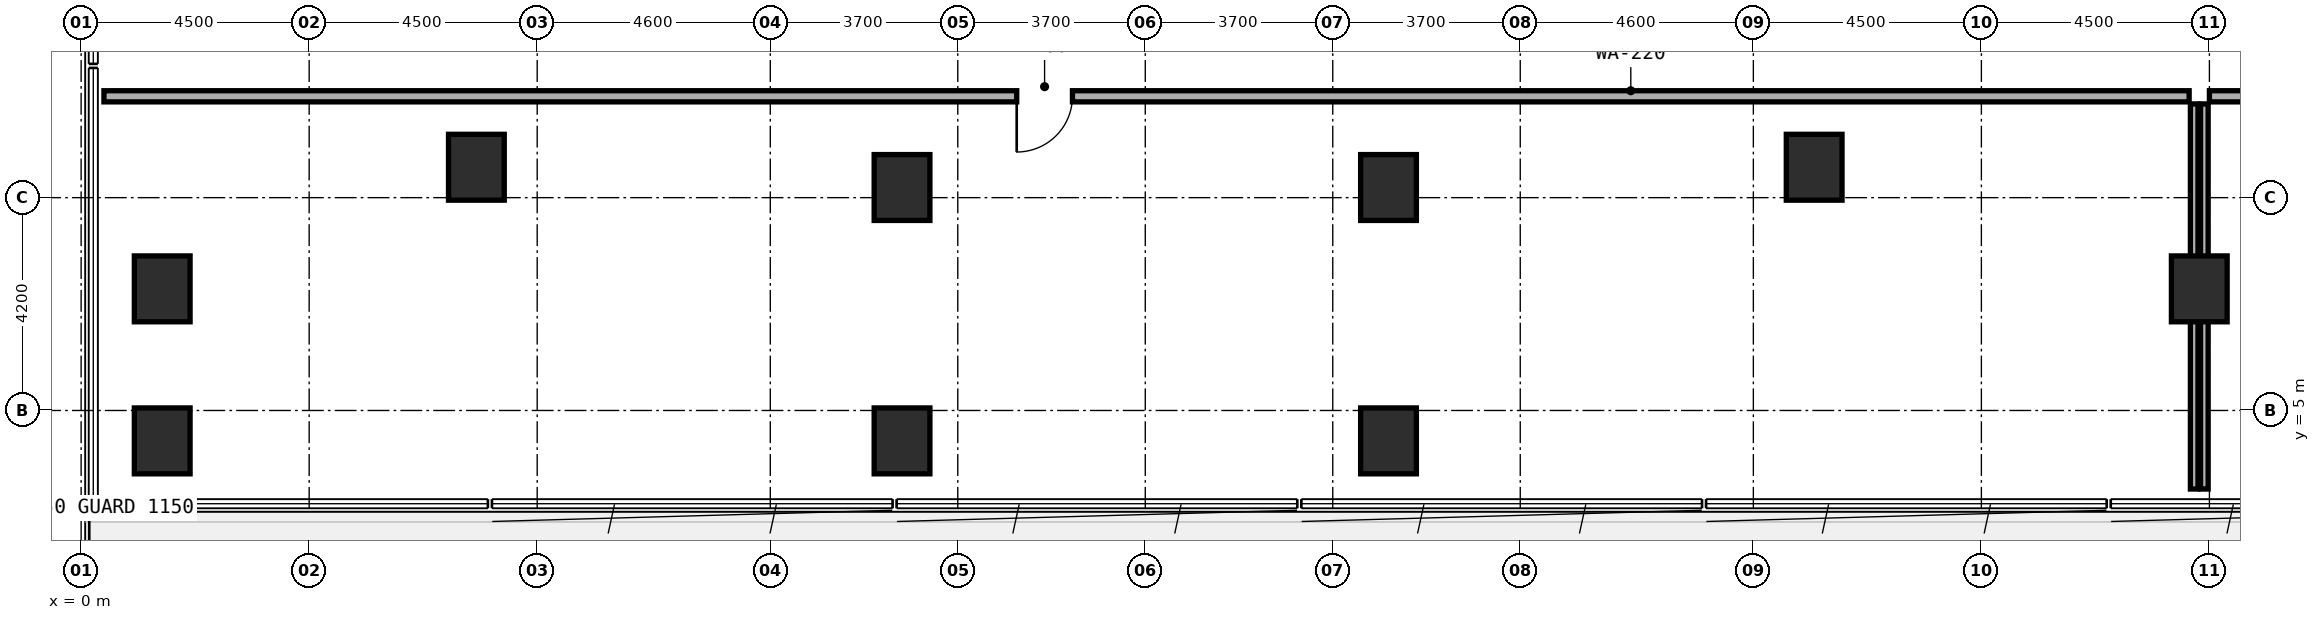
"""IFC4 building model, lengths in metres.
Left out: names, types, materials, properties, quantities, classifications, styles, units other than length and angle.
Written with IfcOpenShell. Run it as: python <this file> out.ifc"""

import sys

from ifc_helpers import new_model, si_unit, direction, frame, frame_2d, origin, origin_2d, place, context, subcontext, project, spatial, rectangle, extrude, element, fill, save


model = new_model("IFC4")
c1 = context("Model", 3, precision=1e-05, world=origin(), true_north=direction((0.0, 1.0)))
c2 = subcontext(c1, "Body", "Model", "MODEL_VIEW")
j1 = project(units=[si_unit("LENGTHUNIT", "METRE"), si_unit("PLANEANGLEUNIT", "RADIAN")], contexts=[c1])
p1 = place(None, origin())
s1 = spatial("IfcSite", under=j1, at=p1, CompositionType="ELEMENT")
p2 = place(p1, origin())
s2 = spatial("IfcBuilding", under=s1, at=p2, CompositionType="ELEMENT")
p3 = place(p2, frame((0.0, 0.0, 10.2)))
s3 = spatial("IfcBuildingStorey", under=s2, at=p3, CompositionType="ELEMENT", Elevation=10.2)
for number, where, z_axis, x_axis in (
    (1, (16.2, 9.4, 0.0), (0.0, 0.0, 1.0), (1.0, 0.0, 0.0)),
    (2, (25.8, 9.4, 0.0), (0.0, 0.0, 1.0), (1.0, 0.0, 0.0)),
    (3, (7.8, 9.8, 0.0), (0.0, 0.0, 1.0), (1.0, 0.0, 0.0)),
    (4, (34.2, 9.8, 0.0), (0.0, 0.0, 1.0), (1.0, 0.0, 0.0)),
    (5, (1.6, 4.4, 0.0), (0.0, 0.0, 1.0), (1.0, 0.0, 0.0)),
    (6, (16.2, 4.4, 0.0), (0.0, 0.0, 1.0), (1.0, 0.0, 0.0)),
    (7, (25.8, 4.4, 0.0), (0.0, 0.0, 1.0), (1.0, 0.0, 0.0)),
    (8, (1.6, 7.4, 0.0), (0.0, 0.0, 1.0), (1.0, 0.0, 0.0)),
    (9, (41.8, 7.4, 0.0), (0.0, 0.0, 1.0), (1.0, 0.0, 0.0)),
):
    element("IfcColumn", number, at=place(p3, frame(where, z_axis=z_axis, x_axis=x_axis)), inside=s3, PredefinedType="COLUMN", context=c2, shape_type="SweptSolid", body=[
        extrude(rectangle(XDim=1.1, YDim=1.3, at=origin_2d()), origin(), (0.0, 0.0, 1.0), 4.8),
    ])
p4 = place(p3, frame((41.7, 3.45, 0.0), z_axis=(0.0, 0.0, 1.0), x_axis=(0.0, 1.0, 0.0)))
e10 = element("IfcWall", 10, at=p4, inside=s3, PredefinedType="PARTITIONING", context=c2, shape_type="SweptSolid", body=[
    extrude(rectangle(XDim=7.6, YDim=0.15, at=frame_2d((3.8, 0.0))), origin(), (0.0, 0.0, 1.0), 3.725),
])
p5 = place(p3, frame((0.45, 11.2, 0.0), z_axis=(0.0, 0.0, 1.0), x_axis=(1.0, 0.0, 0.0)))
e11 = element("IfcWall", 11, at=p5, inside=s3, PredefinedType="SOLIDWALL", context=c2, shape_type="SweptSolid", body=[
    extrude(rectangle(XDim=41.15, YDim=0.22, at=frame_2d((20.575, 0.0))), origin(), (0.0, 0.0, 1.0), 3.525),
])
p6 = place(p5, frame((18.013, 0.0, 0.0)))
e12 = element("IfcOpeningElement", 12, at=p6, cuts=e11, PredefinedType="OPENING", context=c2, shape_type="SweptSolid", body=[
    extrude(rectangle(XDim=1.1, YDim=2.1, at=frame_2d((0.55, 1.05))), frame((0.0, 0.12, 0.0), z_axis=(0.0, -1.0, 0.0), x_axis=(1.0, 0.0, 0.0)), (0.0, 0.0, 1.0), 0.24),
])
p7 = place(p3, frame((41.9, 3.45, 0.0), z_axis=(0.0, 0.0, 1.0), x_axis=(0.0, 1.0, 0.0)))
e13 = element("IfcWall", 13, at=p7, inside=s3, PredefinedType="PARTITIONING", context=c2, shape_type="SweptSolid", body=[
    extrude(rectangle(XDim=7.6, YDim=0.15, at=frame_2d((3.8, 0.0))), origin(), (0.0, 0.0, 1.0), 3.625),
])
p8 = place(p3, frame((42.0, 11.2, 0.0), z_axis=(0.0, 0.0, 1.0), x_axis=(1.0, 0.0, 0.0)))
e14 = element("IfcWall", 14, at=p8, inside=s3, PredefinedType="SOLIDWALL", context=c2, shape_type="SweptSolid", body=[
    extrude(rectangle(XDim=15.4, YDim=0.22, at=frame_2d((7.7, 0.0))), origin(), (0.0, 0.0, 1.0), 4.45),
])
p9 = place(p8, frame((6.425, 0.0, 0.0)))
e15 = element("IfcOpeningElement", 15, at=p9, cuts=e14, PredefinedType="OPENING", context=c2, shape_type="SweptSolid", body=[
    extrude(rectangle(XDim=1.1, YDim=2.1, at=frame_2d((0.55, 1.05))), frame((0.0, 0.12, 0.0), z_axis=(0.0, -1.0, 0.0), x_axis=(1.0, 0.0, 0.0)), (0.0, 0.0, 1.0), 0.24),
])
p10 = place(p6, frame((1.1, 0.0, 0.0), z_axis=(0.0, 0.0, 1.0), x_axis=(-1.0, 0.0, 0.0)))
e16 = element("IfcDoor", 16, at=p10, inside=s3, OperationType="SINGLE_SWING_RIGHT", PredefinedType="DOOR", context=c2, shape_type="SweptSolid", body=[
    extrude(rectangle(XDim=1.1, YDim=2.1, at=frame_2d((0.55, 1.05))), frame((0.0, 0.025, 0.0), z_axis=(0.0, -1.0, 0.0), x_axis=(1.0, 0.0, 0.0)), (0.0, 0.0, 1.0), 0.05),
])
fill(e12, e16)
save(model, sys.argv[1])
